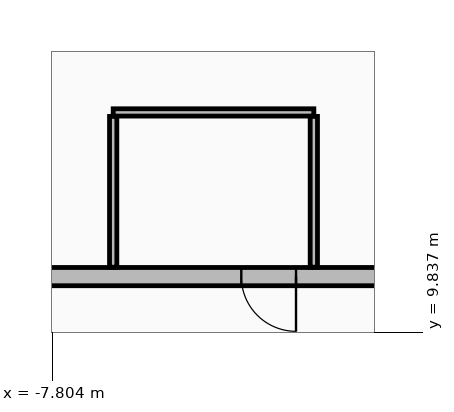
"""IFC4 building model, lengths in metres.
Left out: names, types, materials, properties, quantities, classifications, styles, units other than length and angle.
Written with IfcOpenShell. Run it as: python <this file> out.ifc"""

import sys

from ifc_helpers import new_model, si_unit, direction, frame, frame_2d, origin, place, context, subcontext, project, spatial, rectangle, extrude, element, fill, save


model = new_model("IFC4")
c1 = context("Model", 3, precision=1e-05, world=origin(), true_north=direction((0.0, 1.0)))
c2 = subcontext(c1, "Body", "Model", "MODEL_VIEW")
j1 = project(units=[si_unit("LENGTHUNIT", "METRE"), si_unit("PLANEANGLEUNIT", "RADIAN")], contexts=[c1])
p1 = place(None, origin())
s1 = spatial("IfcSite", under=j1, at=p1, CompositionType="ELEMENT")
p2 = place(p1, origin())
s2 = spatial("IfcBuilding", under=s1, at=p2, CompositionType="ELEMENT")
p3 = place(p2, frame((0.0, 0.0, 165.15)))
s3 = spatial("IfcBuildingStorey", under=s2, at=p3, CompositionType="ELEMENT", Elevation=165.15)
p4 = place(p3, frame((12.05, 10.75, 0.0), z_axis=(0.0, 0.0, 1.0), x_axis=(-1.0, 0.0, 0.0)))
e1 = element("IfcWall", 1, at=p4, inside=s3, PredefinedType="STANDARD", context=c2, shape_type="SweptSolid", body=[
    extrude(rectangle(XDim=24.1, YDim=0.3, at=frame_2d((12.05, 0.0))), origin(), (0.0, 0.0, 1.0), 4.465),
])
p5 = place(p4, frame((15.843, 0.0, 0.0)))
e2 = element("IfcOpeningElement", 2, at=p5, cuts=e1, PredefinedType="OPENING", context=c2, shape_type="SweptSolid", body=[
    extrude(rectangle(XDim=0.9, YDim=2.1, at=frame_2d((0.45, 1.05))), frame((0.0, 0.16, 0.0), z_axis=(0.0, -1.0, 0.0), x_axis=(1.0, 0.0, 0.0)), (0.0, 0.0, 1.0), 0.32),
])
p6 = place(p3, frame((-6.8, 13.45, 0.0), z_axis=(0.0, 0.0, 1.0), x_axis=(1.0, 0.0, 0.0)))
e3 = element("IfcWall", 3, at=p6, inside=s3, PredefinedType="PARTITIONING", context=c2, shape_type="SweptSolid", body=[
    extrude(rectangle(XDim=3.3, YDim=0.12, at=frame_2d((1.65, 0.0))), origin(), (0.0, 0.0, 1.0), 4.805),
])
for number, where, z_axis, x_axis in (
    (4, (-3.5, 13.385, 0.0), (0.0, 0.0, 1.0), (0.0, -1.0, 0.0)),
    (5, (-6.8, 10.905, 0.0), (0.0, 0.0, 1.0), (0.0, 1.0, 0.0)),
):
    element("IfcWall", number, at=place(p3, frame(where, z_axis=z_axis, x_axis=x_axis)), inside=s3, PredefinedType="PARTITIONING", context=c2, shape_type="SweptSolid", body=[
        extrude(rectangle(XDim=2.48, YDim=0.12, at=frame_2d((1.24, 0.0))), origin(), (0.0, 0.0, 1.0), 4.805),
    ])
p7 = place(p5, origin())
e6 = element("IfcDoor", 6, at=p7, inside=s3, OperationType="SINGLE_SWING_LEFT", PredefinedType="DOOR", context=c2, shape_type="SweptSolid", body=[
    extrude(rectangle(XDim=0.9, YDim=2.1, at=frame_2d((0.45, 1.05))), frame((0.0, 0.025, 0.0), z_axis=(0.0, -1.0, 0.0), x_axis=(1.0, 0.0, 0.0)), (0.0, 0.0, 1.0), 0.05),
])
fill(e2, e6)
save(model, sys.argv[1])
